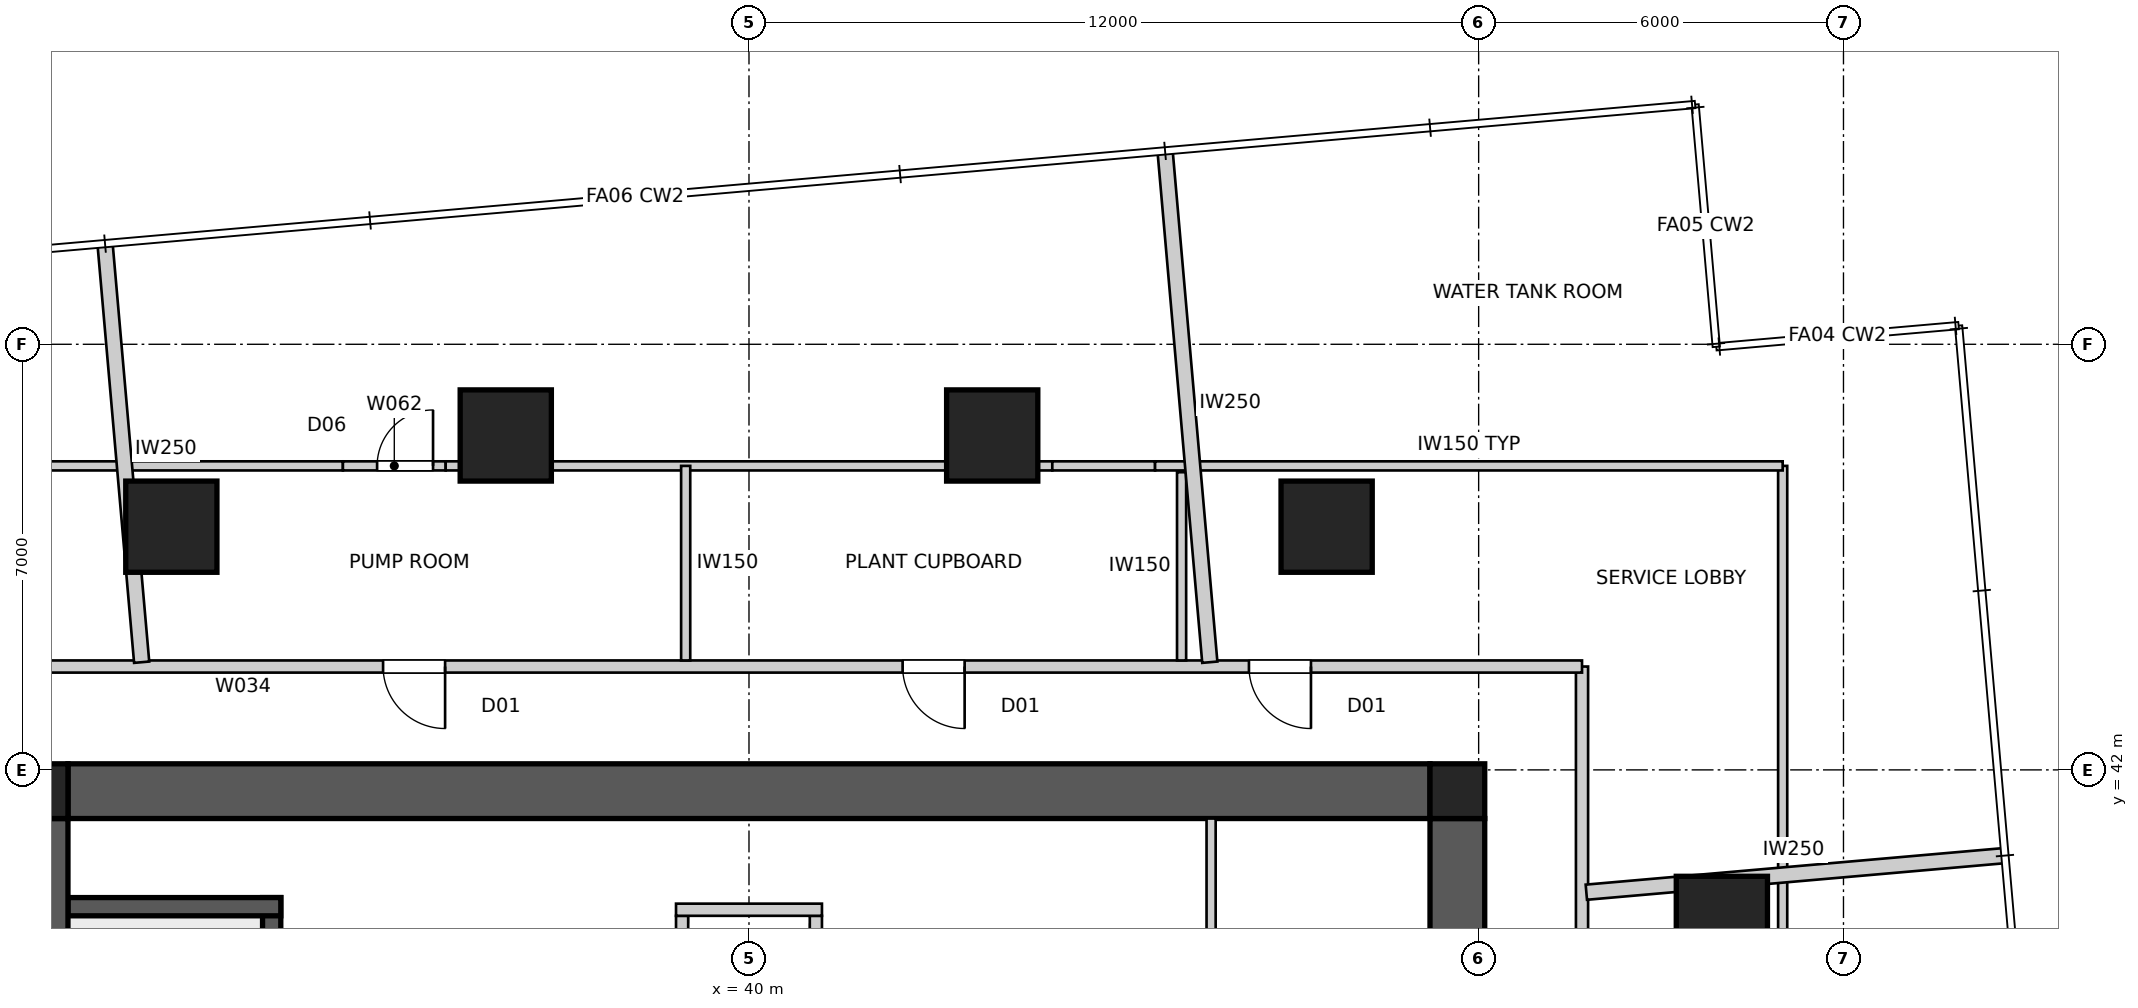
"""IFC4 building model, lengths in metres.
Left out: names, types, materials, properties, quantities, classifications, styles, units other than length and angle.
Written with IfcOpenShell. Run it as: python <this file> out.ifc"""

import sys

from ifc_helpers import new_model, si_unit, direction, frame, frame_2d, origin, origin_2d, place, context, subcontext, project, spatial, polyline, rectangle, outline, extrude, element, fill, save


model = new_model("IFC4")
c1 = context("Model", 3, precision=1e-05, world=origin(), true_north=direction((0.0, 1.0)))
c2 = subcontext(c1, "Body", "Model", "MODEL_VIEW")
j1 = project(units=[si_unit("LENGTHUNIT", "METRE"), si_unit("PLANEANGLEUNIT", "RADIAN")], contexts=[c1])
p1 = place(None, origin())
s1 = spatial("IfcSite", under=j1, at=p1, CompositionType="ELEMENT")
p2 = place(p1, origin())
s2 = spatial("IfcBuilding", under=s1, at=p2, CompositionType="ELEMENT")
p3 = place(p2, frame((0.0, 0.0, 42.2)))
s3 = spatial("IfcBuildingStorey", under=s2, at=p3, CompositionType="ELEMENT", Elevation=42.2)
p4 = place(p3, frame((28.8, 41.65, 0.0), z_axis=(0.0, 0.0, 1.0), x_axis=(1.0, 0.0, 0.0)))
e1 = element("IfcWall", 1, at=p4, inside=s3, PredefinedType="SHEAR", context=c2, shape_type="SweptSolid", body=[
    extrude(outline(polyline([(0.0, -0.45), (22.4, -0.45), (22.4, -0.025), (22.85, -0.025), (22.85, 0.025), (22.4, 0.025), (22.4, 0.45), (0.0, 0.45), (0.0, 0.025), (-0.45, 0.025), (-0.45, -0.025), (0.0, -0.025), (0.0, -0.45)])), origin(), (0.0, 0.0, 1.0), 5.0),
])
p5 = place(p3, frame((51.65, 18.8, 0.0), z_axis=(0.0, 0.0, 1.0), x_axis=(0.0, 1.0, 0.0)))
e2 = element("IfcWall", 2, at=p5, inside=s3, PredefinedType="SHEAR", context=c2, shape_type="SweptSolid", body=[
    extrude(outline(polyline([(0.0, -0.45), (22.4, -0.45), (22.4, -0.025), (22.85, -0.025), (22.85, 0.025), (22.4, 0.025), (22.4, 0.45), (0.0, 0.45), (0.0, 0.025), (-0.45, 0.025), (-0.45, -0.025), (0.0, -0.025), (0.0, -0.45)])), origin(), (0.0, 0.0, 1.0), 5.0),
])
p6 = place(p5, frame((11.14, 0.0, 0.0)))
e3 = element("IfcOpeningElement", 3, at=p6, cuts=e2, PredefinedType="OPENING", context=c2, shape_type="SweptSolid", body=[
    extrude(rectangle(XDim=1.02, YDim=2.4, at=frame_2d((0.51, 1.2))), frame((0.0, 0.46, 0.0), z_axis=(0.0, -1.0, 0.0), x_axis=(1.0, 0.0, 0.0)), (0.0, 0.0, 1.0), 0.92),
])
p7 = place(p3, frame((28.35, 41.2, 0.0), z_axis=(0.0, 0.0, 1.0), x_axis=(0.0, -1.0, 0.0)))
e4 = element("IfcWall", 4, at=p7, inside=s3, PredefinedType="SHEAR", context=c2, shape_type="SweptSolid", body=[
    extrude(outline(polyline([(0.0, -0.45), (22.4, -0.45), (22.4, -0.025), (22.85, -0.025), (22.85, 0.025), (22.4, 0.025), (22.4, 0.45), (0.0, 0.45), (0.0, 0.025), (-0.45, 0.025), (-0.45, -0.025), (0.0, -0.025), (0.0, -0.45)])), origin(), (0.0, 0.0, 1.0), 5.0),
])
p8 = place(p7, frame((11.14, 0.0, 0.0)))
e5 = element("IfcOpeningElement", 5, at=p8, cuts=e4, PredefinedType="OPENING", context=c2, shape_type="SweptSolid", body=[
    extrude(rectangle(XDim=1.02, YDim=2.4, at=frame_2d((0.51, 1.2))), frame((0.0, 0.46, 0.0), z_axis=(0.0, -1.0, 0.0), x_axis=(1.0, 0.0, 0.0)), (0.0, 0.0, 1.0), 0.92),
])
p9 = place(p3, frame((32.15, 32.2, 0.0), z_axis=(0.0, 0.0, 1.0), x_axis=(0.0, 1.0, 0.0)))
e6 = element("IfcWall", 6, at=p9, inside=s3, PredefinedType="SHEAR", context=c2, shape_type="SweptSolid", body=[
    extrude(rectangle(XDim=7.7, YDim=0.3, at=frame_2d((3.85, 0.0))), origin(), (0.0, 0.0, 1.0), 5.0),
])
p10 = place(p3, frame((28.8, 39.75, 0.0), z_axis=(0.0, 0.0, 1.0), x_axis=(1.0, 0.0, 0.0)))
e7 = element("IfcWall", 7, at=p10, inside=s3, PredefinedType="SHEAR", context=c2, shape_type="SweptSolid", body=[
    extrude(rectangle(XDim=3.5, YDim=0.3, at=frame_2d((1.75, 0.0))), origin(), (0.0, 0.0, 1.0), 5.0),
])
for number, where, z_axis, x_axis in (
    (8, (38.9, 37.6, 0.0), (0.0, 0.0, 1.0), (0.0, 1.0, 0.0)),
    (9, (41.1, 37.6, 0.0), (0.0, 0.0, 1.0), (0.0, 1.0, 0.0)),
):
    element("IfcWall", number, at=place(p3, frame(where, z_axis=z_axis, x_axis=x_axis)), inside=s3, PredefinedType="SOLIDWALL", context=c2, shape_type="SweptSolid", body=[
        extrude(rectangle(XDim=2.0, YDim=0.2, at=frame_2d((1.0, 0.0))), origin(), (0.0, 0.0, 1.0), 5.0),
    ])
p11 = place(p3, frame((38.8, 39.7, 0.0), z_axis=(0.0, 0.0, 1.0), x_axis=(1.0, 0.0, 0.0)))
e10 = element("IfcWall", 10, at=p11, inside=s3, PredefinedType="SOLIDWALL", context=c2, shape_type="SweptSolid", body=[
    extrude(rectangle(XDim=2.4, YDim=0.2, at=frame_2d((1.2, 0.0))), origin(), (0.0, 0.0, 1.0), 5.0),
])
for number, where, z_axis, x_axis in (
    (11, (51.65, 41.65, 0.0), (0.0, 0.0, 1.0), (1.0, 0.0, 0.0)),
    (12, (28.35, 41.65, 0.0), (0.0, 0.0, 1.0), (1.0, 0.0, 0.0)),
):
    element("IfcColumn", number, at=place(p3, frame(where, z_axis=z_axis, x_axis=x_axis)), inside=s3, PredefinedType="COLUMN", context=c2, shape_type="SweptSolid", body=[
        extrude(rectangle(XDim=0.9, YDim=0.9, at=origin_2d()), origin(), (0.0, 0.0, 1.0), 5.0),
    ])
for number, where, z_axis, x_axis in (
    (13, (56.0, 39.5, 0.0), (0.0, 0.0, 1.0), (1.0, 0.0, 0.0)),
    (14, (49.5, 46.0, 0.0), (0.0, 0.0, 1.0), (1.0, 0.0, 0.0)),
    (15, (44.0, 47.5, 0.0), (0.0, 0.0, 1.0), (1.0, 0.0, 0.0)),
    (16, (36.0, 47.5, 0.0), (0.0, 0.0, 1.0), (1.0, 0.0, 0.0)),
    (17, (30.5, 46.0, 0.0), (0.0, 0.0, 1.0), (1.0, 0.0, 0.0)),
):
    element("IfcColumn", number, at=place(p3, frame(where, z_axis=z_axis, x_axis=x_axis)), inside=s3, PredefinedType="COLUMN", context=c2, shape_type="SweptSolid", body=[
        extrude(rectangle(XDim=1.5, YDim=1.5, at=origin_2d()), origin(), (0.0, 0.0, 1.0), 5.0),
    ])
p12 = place(p3, frame((53.7, 16.3, 0.0), z_axis=(0.0, 0.0, 1.0), x_axis=(0.0, 1.0, 0.0)))
e18 = element("IfcWall", 18, at=p12, inside=s3, PredefinedType="PARTITIONING", context=c2, shape_type="SweptSolid", body=[
    extrude(rectangle(XDim=27.4, YDim=0.2, at=frame_2d((13.7, 0.0))), origin(), (0.0, 0.0, 1.0), 4.85),
])
p13 = place(p12, frame((18.698, 0.0, 0.0)))
e19 = element("IfcOpeningElement", 19, at=p13, cuts=e18, PredefinedType="OPENING", context=c2, shape_type="SweptSolid", body=[
    extrude(rectangle(XDim=1.02, YDim=2.34, at=frame_2d((0.51, 1.17))), frame((0.0, 0.11, 0.0), z_axis=(0.0, -1.0, 0.0), x_axis=(1.0, 0.0, 0.0)), (0.0, 0.0, 1.0), 0.22),
])
p14 = place(p12, frame((10.153, 0.0, 0.0)))
e20 = element("IfcOpeningElement", 20, at=p14, cuts=e18, PredefinedType="OPENING", context=c2, shape_type="SweptSolid", body=[
    extrude(rectangle(XDim=1.02, YDim=2.34, at=frame_2d((0.51, 1.17))), frame((0.0, 0.11, 0.0), z_axis=(0.0, -1.0, 0.0), x_axis=(1.0, 0.0, 0.0)), (0.0, 0.0, 1.0), 0.22),
])
p15 = place(p12, frame((4.458, 0.0, 0.0)))
e21 = element("IfcOpeningElement", 21, at=p15, cuts=e18, PredefinedType="OPENING", context=c2, shape_type="SweptSolid", body=[
    extrude(rectangle(XDim=1.02, YDim=2.34, at=frame_2d((0.51, 1.17))), frame((0.0, 0.11, 0.0), z_axis=(0.0, -1.0, 0.0), x_axis=(1.0, 0.0, 0.0)), (0.0, 0.0, 1.0), 0.22),
])
p16 = place(p3, frame((53.7, 43.7, 0.0), z_axis=(0.0, 0.0, 1.0), x_axis=(-1.0, 0.0, 0.0)))
e22 = element("IfcWall", 22, at=p16, inside=s3, PredefinedType="PARTITIONING", context=c2, shape_type="SweptSolid", body=[
    extrude(rectangle(XDim=27.4, YDim=0.2, at=frame_2d((13.7, 0.0))), origin(), (0.0, 0.0, 1.0), 4.85),
])
p17 = place(p16, frame((18.698, 0.0, 0.0)))
e23 = element("IfcOpeningElement", 23, at=p17, cuts=e22, PredefinedType="OPENING", context=c2, shape_type="SweptSolid", body=[
    extrude(rectangle(XDim=1.02, YDim=2.34, at=frame_2d((0.51, 1.17))), frame((0.0, 0.11, 0.0), z_axis=(0.0, -1.0, 0.0), x_axis=(1.0, 0.0, 0.0)), (0.0, 0.0, 1.0), 0.22),
])
p18 = place(p16, frame((10.153, 0.0, 0.0)))
e24 = element("IfcOpeningElement", 24, at=p18, cuts=e22, PredefinedType="OPENING", context=c2, shape_type="SweptSolid", body=[
    extrude(rectangle(XDim=1.02, YDim=2.34, at=frame_2d((0.51, 1.17))), frame((0.0, 0.11, 0.0), z_axis=(0.0, -1.0, 0.0), x_axis=(1.0, 0.0, 0.0)), (0.0, 0.0, 1.0), 0.22),
])
p19 = place(p16, frame((4.458, 0.0, 0.0)))
e25 = element("IfcOpeningElement", 25, at=p19, cuts=e22, PredefinedType="OPENING", context=c2, shape_type="SweptSolid", body=[
    extrude(rectangle(XDim=1.02, YDim=2.34, at=frame_2d((0.51, 1.17))), frame((0.0, 0.11, 0.0), z_axis=(0.0, -1.0, 0.0), x_axis=(1.0, 0.0, 0.0)), (0.0, 0.0, 1.0), 0.22),
])
p20 = place(p3, frame((60.656, 40.591, 0.0), z_axis=(0.0, 0.0, 1.0), x_axis=(-0.996194982798, -0.087152488477, 0.0)))
e26 = element("IfcWall", 26, at=p20, inside=s3, PredefinedType="PARTITIONING", context=c2, shape_type="SweptSolid", body=[
    extrude(rectangle(XDim=6.911, YDim=0.25, at=frame_2d((3.456, 0.0))), origin(), (0.0, 0.0, 1.0), 4.85),
])
p21 = place(p3, frame((46.843, 52.181, 0.0), z_axis=(0.0, 0.0, 1.0), x_axis=(0.087163721544, -0.996194000005, 0.0)))
e27 = element("IfcWall", 27, at=p21, inside=s3, PredefinedType="PARTITIONING", context=c2, shape_type="SweptSolid", body=[
    extrude(rectangle(XDim=8.442, YDim=0.25, at=frame_2d((4.221, 0.0))), origin(), (0.0, 0.0, 1.0), 4.85),
])
p22 = place(p3, frame((29.409, 50.656, 0.0), z_axis=(0.0, 0.0, 1.0), x_axis=(0.087152488477, -0.996194982798, 0.0)))
e28 = element("IfcWall", 28, at=p22, inside=s3, PredefinedType="PARTITIONING", context=c2, shape_type="SweptSolid", body=[
    extrude(rectangle(XDim=6.911, YDim=0.25, at=frame_2d((3.456, 0.0))), origin(), (0.0, 0.0, 1.0), 4.85),
])
p23 = place(p3, frame((47.6, 41.2, 0.0), z_axis=(0.0, 0.0, 1.0), x_axis=(0.0, -1.0, 0.0)))
e29 = element("IfcWall", 29, at=p23, inside=s3, PredefinedType="SOLIDWALL", context=c2, shape_type="SweptSolid", body=[
    extrude(rectangle(XDim=5.9, YDim=0.15, at=frame_2d((2.95, 0.0))), origin(), (0.0, 0.0, 1.0), 4.85),
])
p24 = place(p3, frame((57.0, 47.0, 0.0), z_axis=(0.0, 0.0, 1.0), x_axis=(0.0, -1.0, 0.0)))
e30 = element("IfcWall", 30, at=p24, inside=s3, PredefinedType="SOLIDWALL", context=c2, shape_type="SweptSolid", body=[
    extrude(rectangle(XDim=10.322, YDim=0.15, at=frame_2d((5.161, 0.0))), origin(), (0.0, 0.0, 1.0), 4.85),
])
p25 = place(p3, frame((47.115, 43.8, 0.0), z_axis=(0.0, 0.0, 1.0), x_axis=(0.0, 1.0, 0.0)))
e31 = element("IfcWall", 31, at=p25, inside=s3, PredefinedType="SOLIDWALL", context=c2, shape_type="SweptSolid", body=[
    extrude(rectangle(XDim=3.096, YDim=0.15, at=frame_2d((1.548, 0.0))), origin(), (0.0, 0.0, 1.0), 4.85),
])
p26 = place(p3, frame((23.0, 47.0, 0.0), z_axis=(0.0, 0.0, 1.0), x_axis=(1.0, 0.0, 0.0)))
e32 = element("IfcWall", 32, at=p26, inside=s3, PredefinedType="SOLIDWALL", context=c2, shape_type="SweptSolid", body=[
    extrude(rectangle(XDim=10.322, YDim=0.15, at=frame_2d((5.161, 0.0))), origin(), (0.0, 0.0, 1.0), 4.85),
])
p27 = place(p3, frame((33.322, 47.0, 0.0), z_axis=(0.0, 0.0, 1.0), x_axis=(1.0, 0.0, 0.0)))
e33 = element("IfcWall", 33, at=p27, inside=s3, PredefinedType="SOLIDWALL", context=c2, shape_type="SweptSolid", body=[
    extrude(rectangle(XDim=1.69, YDim=0.15, at=frame_2d((0.845, 0.0))), origin(), (0.0, 0.0, 1.0), 3.85),
])
p28 = place(p27, frame((0.562, 0.0, 0.0)))
e34 = element("IfcOpeningElement", 34, at=p28, cuts=e33, PredefinedType="OPENING", context=c2, shape_type="SweptSolid", body=[
    extrude(rectangle(XDim=0.92, YDim=2.1, at=frame_2d((0.46, 1.05))), frame((0.0, 0.085, 0.0), z_axis=(0.0, -1.0, 0.0), x_axis=(1.0, 0.0, 0.0)), (0.0, 0.0, 1.0), 0.17),
])
p29 = place(p3, frame((35.012, 47.0, 0.0), z_axis=(0.0, 0.0, 1.0), x_axis=(1.0, 0.0, 0.0)))
e35 = element("IfcWall", 35, at=p29, inside=s3, PredefinedType="SOLIDWALL", context=c2, shape_type="SweptSolid", body=[
    extrude(rectangle(XDim=9.977, YDim=0.15, at=frame_2d((4.988, 0.0))), origin(), (0.0, 0.0, 1.0), 4.85),
])
p30 = place(p3, frame((44.988, 47.0, 0.0), z_axis=(0.0, 0.0, 1.0), x_axis=(1.0, 0.0, 0.0)))
e36 = element("IfcWall", 36, at=p30, inside=s3, PredefinedType="SOLIDWALL", context=c2, shape_type="SweptSolid", body=[
    extrude(rectangle(XDim=1.69, YDim=0.15, at=frame_2d((0.845, 0.0))), origin(), (0.0, 0.0, 1.0), 3.85),
])
p31 = place(p3, frame((46.678, 47.0, 0.0), z_axis=(0.0, 0.0, 1.0), x_axis=(1.0, 0.0, 0.0)))
e37 = element("IfcWall", 37, at=p31, inside=s3, PredefinedType="SOLIDWALL", context=c2, shape_type="SweptSolid", body=[
    extrude(rectangle(XDim=10.322, YDim=0.15, at=frame_2d((5.161, 0.0))), origin(), (0.0, 0.0, 1.0), 4.85),
])
p32 = place(p3, frame((38.959, 47.0, 0.0), z_axis=(0.0, 0.0, 1.0), x_axis=(0.0, -1.0, 0.0)))
e38 = element("IfcWall", 38, at=p32, inside=s3, PredefinedType="SOLIDWALL", context=c2, shape_type="SweptSolid", body=[
    extrude(rectangle(XDim=3.2, YDim=0.15, at=frame_2d((1.6, 0.0))), origin(), (0.0, 0.0, 1.0), 4.85),
])
p33 = place(p17, origin())
e39 = element("IfcDoor", 39, at=p33, inside=s3, OperationType="SINGLE_SWING_LEFT", PredefinedType="DOOR", context=c2, shape_type="SweptSolid", body=[
    extrude(rectangle(XDim=1.02, YDim=2.34, at=frame_2d((0.51, 1.17))), frame((0.0, 0.025, 0.0), z_axis=(0.0, -1.0, 0.0), x_axis=(1.0, 0.0, 0.0)), (0.0, 0.0, 1.0), 0.05),
])
fill(e23, e39)
p34 = place(p18, origin())
e40 = element("IfcDoor", 40, at=p34, inside=s3, OperationType="SINGLE_SWING_LEFT", PredefinedType="DOOR", context=c2, shape_type="SweptSolid", body=[
    extrude(rectangle(XDim=1.02, YDim=2.34, at=frame_2d((0.51, 1.17))), frame((0.0, 0.025, 0.0), z_axis=(0.0, -1.0, 0.0), x_axis=(1.0, 0.0, 0.0)), (0.0, 0.0, 1.0), 0.05),
])
fill(e24, e40)
p35 = place(p19, origin())
e41 = element("IfcDoor", 41, at=p35, inside=s3, OperationType="SINGLE_SWING_LEFT", PredefinedType="DOOR", context=c2, shape_type="SweptSolid", body=[
    extrude(rectangle(XDim=1.02, YDim=2.34, at=frame_2d((0.51, 1.17))), frame((0.0, 0.025, 0.0), z_axis=(0.0, -1.0, 0.0), x_axis=(1.0, 0.0, 0.0)), (0.0, 0.0, 1.0), 0.05),
])
fill(e25, e41)
p36 = place(p28, origin())
e42 = element("IfcDoor", 42, at=p36, inside=s3, OperationType="SINGLE_SWING_RIGHT", PredefinedType="DOOR", context=c2, shape_type="SweptSolid", body=[
    extrude(rectangle(XDim=0.92, YDim=2.1, at=frame_2d((0.46, 1.05))), frame((0.0, 0.025, 0.0), z_axis=(0.0, -1.0, 0.0), x_axis=(1.0, 0.0, 0.0)), (0.0, 0.0, 1.0), 0.05),
])
fill(e34, e42)
save(model, sys.argv[1])
